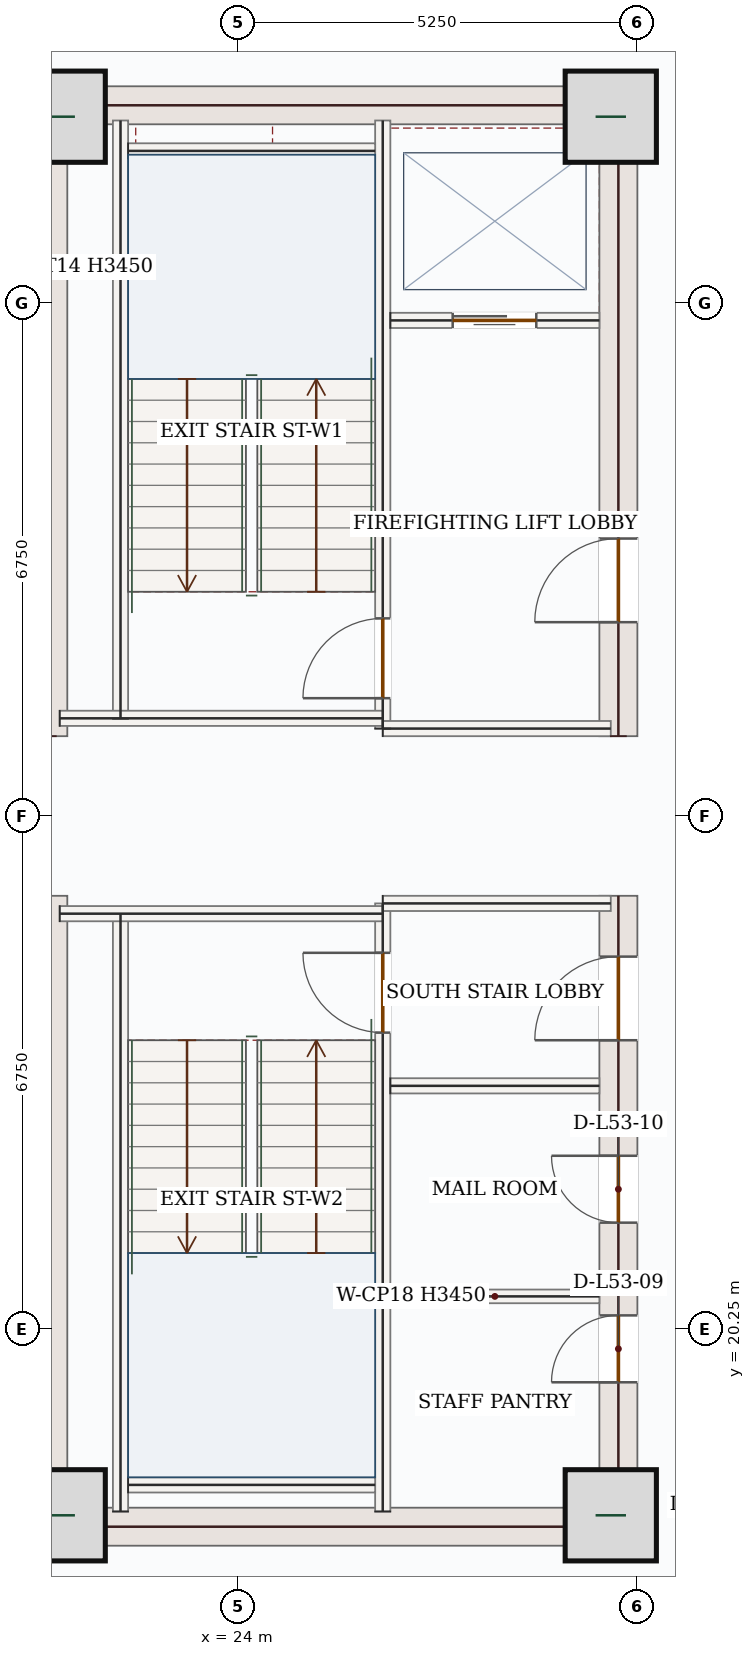
"""IFC4 building model, lengths in metres.
Left out: names, types, materials, properties, quantities, classifications, styles, units other than length and angle.
Written with IfcOpenShell. Run it as: python <this file> out.ifc"""

import sys

from ifc_helpers import new_model, si_unit, direction, frame, frame_2d, origin, origin_2d, place, context, subcontext, project, spatial, rectangle, extrude, source, transform, mapped, element, fill, save


model = new_model("IFC4")
c1 = context("Model", 3, precision=1e-05, world=origin(), true_north=direction((0.0, 1.0)))
c2 = subcontext(c1, "Body", "Model", "MODEL_VIEW")
j1 = project(units=[si_unit("LENGTHUNIT", "METRE"), si_unit("PLANEANGLEUNIT", "RADIAN")], contexts=[c1])
p1 = place(None, origin())
s1 = spatial("IfcSite", under=j1, at=p1, CompositionType="ELEMENT")
p2 = place(p1, origin())
s2 = spatial("IfcBuilding", under=s1, at=p2, CompositionType="ELEMENT")
p3 = place(p2, frame((0.0, 0.0, 225.3)))
s3 = spatial("IfcBuildingStorey", under=s2, at=p3, CompositionType="ELEMENT", Elevation=225.3)
m1 = source(origin(), c2, "Body", "SweptSolid", [
    extrude(rectangle(XDim=8.55, YDim=0.5, at=frame_2d((4.275, 0.0))), origin(), (0.0, 0.0, 1.0), 3.45),
])
for number, where, z_axis, x_axis in (
    (1, (21.5, 17.4, 0.0), (0.0, 0.0, 1.0), (0.0, 1.0, 0.0)),
    (2, (21.5, 28.05, 0.0), (0.0, 0.0, 1.0), (0.0, 1.0, 0.0)),
):
    element("IfcWall", number, at=place(p3, frame(where, z_axis=z_axis, x_axis=x_axis)), inside=s3, PredefinedType="SHEAR", context=c2, shape_type="MappedRepresentation", body=[
        mapped(m1, transform((0.0, 0.0, 0.0), x_axis=(1.0, 0.0, 0.0), y_axis=(0.0, 1.0, 0.0), z_axis=(0.0, 0.0, 1.0), scale=1.0)),
    ])
p4 = place(p3, frame((29.0, 17.4, 0.0), z_axis=(0.0, 0.0, 1.0), x_axis=(0.0, 1.0, 0.0)))
e3 = element("IfcWall", 3, at=p4, inside=s3, PredefinedType="SHEAR", context=c2, shape_type="SweptSolid", body=[
    extrude(rectangle(XDim=8.55, YDim=0.5, at=frame_2d((4.275, 0.0))), origin(), (0.0, 0.0, 1.0), 3.45),
])
p5 = place(p4, frame((6.65, 0.0, 0.0)))
e4 = element("IfcOpeningElement", 4, at=p5, cuts=e3, PredefinedType="OPENING", context=c2, shape_type="SweptSolid", body=[
    extrude(rectangle(XDim=1.1, YDim=2.2, at=frame_2d((0.55, 1.1))), frame((0.0, 0.26, 0.0), z_axis=(0.0, -1.0, 0.0), x_axis=(1.0, 0.0, 0.0)), (0.0, 0.0, 1.0), 0.52),
])
p6 = place(p4, frame((2.15, 0.0, 0.0)))
e5 = element("IfcOpeningElement", 5, at=p6, cuts=e3, PredefinedType="OPENING", context=c2, shape_type="SweptSolid", body=[
    extrude(rectangle(XDim=0.88, YDim=2.1, at=frame_2d((0.44, 1.05))), frame((0.0, 0.26, 0.0), z_axis=(0.0, -1.0, 0.0), x_axis=(1.0, 0.0, 0.0)), (0.0, 0.0, 1.0), 0.52),
])
p7 = place(p4, frame((4.25, 0.0, 0.0)))
e6 = element("IfcOpeningElement", 6, at=p7, cuts=e3, PredefinedType="OPENING", context=c2, shape_type="SweptSolid", body=[
    extrude(rectangle(XDim=0.88, YDim=2.1, at=frame_2d((0.44, 1.05))), frame((0.0, 0.26, 0.0), z_axis=(0.0, -1.0, 0.0), x_axis=(1.0, 0.0, 0.0)), (0.0, 0.0, 1.0), 0.52),
])
p8 = place(p3, frame((29.0, 28.05, 0.0), z_axis=(0.0, 0.0, 1.0), x_axis=(0.0, 1.0, 0.0)))
e7 = element("IfcWall", 7, at=p8, inside=s3, PredefinedType="SHEAR", context=c2, shape_type="SweptSolid", body=[
    extrude(rectangle(XDim=8.55, YDim=0.5, at=frame_2d((4.275, 0.0))), origin(), (0.0, 0.0, 1.0), 3.45),
])
p9 = place(p8, frame((1.5, 0.0, 0.0)))
e8 = element("IfcOpeningElement", 8, at=p9, cuts=e7, PredefinedType="OPENING", context=c2, shape_type="SweptSolid", body=[
    extrude(rectangle(XDim=1.1, YDim=2.2, at=frame_2d((0.55, 1.1))), frame((0.0, 0.26, 0.0), z_axis=(0.0, -1.0, 0.0), x_axis=(1.0, 0.0, 0.0)), (0.0, 0.0, 1.0), 0.52),
])
m2 = source(origin(), c2, "Body", "SweptSolid", [
    extrude(rectangle(XDim=7.0, YDim=0.5, at=frame_2d((3.5, 0.0))), origin(), (0.0, 0.0, 1.0), 3.45),
])
for number, where, z_axis, x_axis in (
    (9, (21.75, 17.65, 0.0), (0.0, 0.0, 1.0), (1.0, 0.0, 0.0)),
    (10, (21.75, 36.35, 0.0), (0.0, 0.0, 1.0), (1.0, 0.0, 0.0)),
):
    element("IfcWall", number, at=place(p3, frame(where, z_axis=z_axis, x_axis=x_axis)), inside=s3, PredefinedType="SHEAR", context=c2, shape_type="MappedRepresentation", body=[
        mapped(m2, transform((0.0, 0.0, 0.0), x_axis=(1.0, 0.0, 0.0), y_axis=(0.0, 1.0, 0.0), z_axis=(0.0, 0.0, 1.0), scale=1.0)),
    ])
m3 = source(origin(), c2, "Body", "SweptSolid", [
    extrude(rectangle(XDim=1.2, YDim=1.2, at=origin_2d()), origin(), (0.0, 0.0, 1.0), 3.9),
])
for number, where, z_axis, x_axis in (
    (11, (21.65, 17.8, 0.0), (0.0, 0.0, 1.0), (1.0, 0.0, 0.0)),
    (12, (28.9, 17.8, 0.0), (0.0, 0.0, 1.0), (1.0, 0.0, 0.0)),
    (13, (21.65, 36.2, 0.0), (0.0, 0.0, 1.0), (1.0, 0.0, 0.0)),
    (14, (28.9, 36.2, 0.0), (0.0, 0.0, 1.0), (1.0, 0.0, 0.0)),
):
    element("IfcColumn", number, at=place(p3, frame(where, z_axis=z_axis, x_axis=x_axis)), inside=s3, PredefinedType="COLUMN", context=c2, shape_type="MappedRepresentation", body=[
        mapped(m3, transform((0.0, 0.0, 0.0), x_axis=(1.0, 0.0, 0.0), y_axis=(0.0, 1.0, 0.0), z_axis=(0.0, 0.0, 1.0), scale=1.0)),
    ])
m4 = source(origin(), c2, "Body", "SweptSolid", [
    extrude(rectangle(XDim=5.258, YDim=0.28, at=frame_2d((2.629, 0.0))), origin(), (0.0, 0.0, 1.0), 3.45),
])
p10 = place(p3, frame((18.94, 35.542, 0.0), z_axis=(0.0, 0.0, 1.0), x_axis=(0.707106781187, 0.707106781187, 0.0)))
e15 = element("IfcWall", 15, at=p10, inside=s3, PredefinedType="SOLIDWALL", context=c2, shape_type="MappedRepresentation", body=[
    mapped(m4, transform((0.0, 0.0, 0.0), x_axis=(1.0, 0.0, 0.0), y_axis=(0.0, 1.0, 0.0), z_axis=(0.0, 0.0, 1.0), scale=1.0)),
])
m5 = source(origin(), c2, "Body", "SweptSolid", [
    extrude(rectangle(XDim=7.87, YDim=0.2, at=frame_2d((3.935, 0.0))), origin(), (0.0, 0.0, 1.0), 3.45),
])
for number, where, z_axis, x_axis in (
    (16, (22.45, 17.85, 0.0), (0.0, 0.0, 1.0), (0.0, 1.0, 0.0)),
    (17, (22.45, 28.28, 0.0), (0.0, 0.0, 1.0), (0.0, 1.0, 0.0)),
):
    element("IfcWall", number, at=place(p3, frame(where, z_axis=z_axis, x_axis=x_axis)), inside=s3, PredefinedType="SOLIDWALL", context=c2, shape_type="MappedRepresentation", body=[
        mapped(m5, transform((0.0, 0.0, 0.0), x_axis=(1.0, 0.0, 0.0), y_axis=(0.0, 1.0, 0.0), z_axis=(0.0, 0.0, 1.0), scale=1.0)),
    ])
p11 = place(p3, frame((25.9, 17.85, 0.0), z_axis=(0.0, 0.0, 1.0), x_axis=(0.0, 1.0, 0.0)))
e18 = element("IfcWall", 18, at=p11, inside=s3, PredefinedType="SOLIDWALL", context=c2, shape_type="SweptSolid", body=[
    extrude(rectangle(XDim=8.0, YDim=0.2, at=frame_2d((4.0, 0.0))), origin(), (0.0, 0.0, 1.0), 3.45),
])
p12 = place(p11, frame((6.3, 0.0, 0.0)))
e19 = element("IfcOpeningElement", 19, at=p12, cuts=e18, PredefinedType="OPENING", context=c2, shape_type="SweptSolid", body=[
    extrude(rectangle(XDim=1.05, YDim=2.15, at=frame_2d((0.525, 1.075))), frame((0.0, 0.11, 0.0), z_axis=(0.0, -1.0, 0.0), x_axis=(1.0, 0.0, 0.0)), (0.0, 0.0, 1.0), 0.22),
])
p13 = place(p3, frame((25.9, 28.15, 0.0), z_axis=(0.0, 0.0, 1.0), x_axis=(0.0, 1.0, 0.0)))
e20 = element("IfcWall", 20, at=p13, inside=s3, PredefinedType="SOLIDWALL", context=c2, shape_type="SweptSolid", body=[
    extrude(rectangle(XDim=8.0, YDim=0.2, at=frame_2d((4.0, 0.0))), origin(), (0.0, 0.0, 1.0), 3.45),
])
p14 = place(p13, frame((0.4, 0.0, 0.0)))
e21 = element("IfcOpeningElement", 21, at=p14, cuts=e20, PredefinedType="OPENING", context=c2, shape_type="SweptSolid", body=[
    extrude(rectangle(XDim=1.05, YDim=2.15, at=frame_2d((0.525, 1.075))), frame((0.0, 0.11, 0.0), z_axis=(0.0, -1.0, 0.0), x_axis=(1.0, 0.0, 0.0)), (0.0, 0.0, 1.0), 0.22),
])
m6 = source(origin(), c2, "Body", "SweptSolid", [
    extrude(rectangle(XDim=4.25, YDim=0.2, at=frame_2d((2.125, 0.0))), origin(), (0.0, 0.0, 1.0), 3.45),
])
p15 = place(p3, frame((21.65, 25.715, 0.0), z_axis=(0.0, 0.0, 1.0), x_axis=(1.0, 0.0, 0.0)))
e22 = element("IfcWall", 22, at=p15, inside=s3, PredefinedType="SOLIDWALL", context=c2, shape_type="MappedRepresentation", body=[
    mapped(m6, transform((0.0, 0.0, 0.0), x_axis=(1.0, 0.0, 0.0), y_axis=(0.0, 1.0, 0.0), z_axis=(0.0, 0.0, 1.0), scale=1.0)),
])
m7 = source(origin(), c2, "Body", "SweptSolid", [
    extrude(rectangle(XDim=3.0, YDim=0.2, at=frame_2d((1.5, 0.0))), origin(), (0.0, 0.0, 1.0), 3.45),
])
p16 = place(p3, frame((25.9, 25.85, 0.0), z_axis=(0.0, 0.0, 1.0), x_axis=(1.0, 0.0, 0.0)))
e23 = element("IfcWall", 23, at=p16, inside=s3, PredefinedType="SOLIDWALL", context=c2, shape_type="MappedRepresentation", body=[
    mapped(m7, transform((0.0, 0.0, 0.0), x_axis=(1.0, 0.0, 0.0), y_axis=(0.0, 1.0, 0.0), z_axis=(0.0, 0.0, 1.0), scale=1.0)),
])
p17 = place(p3, frame((21.65, 28.285, 0.0), z_axis=(0.0, 0.0, 1.0), x_axis=(1.0, 0.0, 0.0)))
e24 = element("IfcWall", 24, at=p17, inside=s3, PredefinedType="SOLIDWALL", context=c2, shape_type="MappedRepresentation", body=[
    mapped(m6, transform((0.0, 0.0, 0.0), x_axis=(1.0, 0.0, 0.0), y_axis=(0.0, 1.0, 0.0), z_axis=(0.0, 0.0, 1.0), scale=1.0)),
])
p18 = place(p3, frame((25.9, 28.15, 0.0), z_axis=(0.0, 0.0, 1.0), x_axis=(1.0, 0.0, 0.0)))
e25 = element("IfcWall", 25, at=p18, inside=s3, PredefinedType="SOLIDWALL", context=c2, shape_type="MappedRepresentation", body=[
    mapped(m7, transform((0.0, 0.0, 0.0), x_axis=(1.0, 0.0, 0.0), y_axis=(0.0, 1.0, 0.0), z_axis=(0.0, 0.0, 1.0), scale=1.0)),
])
m8 = source(origin(), c2, "Body", "SweptSolid", [
    extrude(rectangle(XDim=3.25, YDim=0.2, at=frame_2d((1.625, 0.0))), origin(), (0.0, 0.0, 1.0), 3.45),
])
for number, where, z_axis, x_axis in (
    (26, (22.55, 35.75, 0.0), (0.0, 0.0, 1.0), (1.0, 0.0, 0.0)),
    (27, (22.55, 18.2, 0.0), (0.0, 0.0, 1.0), (1.0, 0.0, 0.0)),
):
    element("IfcWall", number, at=place(p3, frame(where, z_axis=z_axis, x_axis=x_axis)), inside=s3, PredefinedType="SOLIDWALL", context=c2, shape_type="MappedRepresentation", body=[
        mapped(m8, transform((0.0, 0.0, 0.0), x_axis=(1.0, 0.0, 0.0), y_axis=(0.0, 1.0, 0.0), z_axis=(0.0, 0.0, 1.0), scale=1.0)),
    ])
p19 = place(p3, frame((26.0, 33.52, 0.0), z_axis=(0.0, 0.0, 1.0), x_axis=(1.0, 0.0, 0.0)))
e28 = element("IfcWall", 28, at=p19, inside=s3, PredefinedType="SOLIDWALL", context=c2, shape_type="SweptSolid", body=[
    extrude(rectangle(XDim=2.75, YDim=0.2, at=frame_2d((1.375, 0.0))), origin(), (0.0, 0.0, 1.0), 3.45),
])
p20 = place(p19, frame((0.82, 0.0, 0.0)))
e29 = element("IfcOpeningElement", 29, at=p20, cuts=e28, PredefinedType="OPENING", context=c2, shape_type="SweptSolid", body=[
    extrude(rectangle(XDim=1.1, YDim=2.15, at=frame_2d((0.55, 1.075))), frame((0.0, 0.11, 0.0), z_axis=(0.0, -1.0, 0.0), x_axis=(1.0, 0.0, 0.0)), (0.0, 0.0, 1.0), 0.22),
])
m9 = source(origin(), c2, "Body", "SweptSolid", [
    extrude(rectangle(XDim=2.75, YDim=0.2, at=frame_2d((1.375, 0.0))), origin(), (0.0, 0.0, 1.0), 3.45),
])
p21 = place(p3, frame((26.0, 23.45, 0.0), z_axis=(0.0, 0.0, 1.0), x_axis=(1.0, 0.0, 0.0)))
e30 = element("IfcWall", 30, at=p21, inside=s3, PredefinedType="SOLIDWALL", context=c2, shape_type="MappedRepresentation", body=[
    mapped(m9, transform((0.0, 0.0, 0.0), x_axis=(1.0, 0.0, 0.0), y_axis=(0.0, 1.0, 0.0), z_axis=(0.0, 0.0, 1.0), scale=1.0)),
])
m10 = source(origin(), c2, "Body", "SweptSolid", [
    extrude(rectangle(XDim=2.75, YDim=0.18, at=frame_2d((1.375, 0.0))), origin(), (0.0, 0.0, 1.0), 3.45),
])
p22 = place(p3, frame((26.0, 20.68, 0.0), z_axis=(0.0, 0.0, 1.0), x_axis=(1.0, 0.0, 0.0)))
e31 = element("IfcWall", 31, at=p22, inside=s3, PredefinedType="PARTITIONING", context=c2, shape_type="MappedRepresentation", body=[
    mapped(m10, transform((0.0, 0.0, 0.0), x_axis=(1.0, 0.0, 0.0), y_axis=(0.0, 1.0, 0.0), z_axis=(0.0, 0.0, 1.0), scale=1.0)),
])
m11 = source(origin(), c2, "Body", "SweptSolid", [
    extrude(rectangle(XDim=1.05, YDim=2.15, at=frame_2d((0.525, 1.075))), frame((0.0, 0.025, 0.0), z_axis=(0.0, -1.0, 0.0), x_axis=(1.0, 0.0, 0.0)), (0.0, 0.0, 1.0), 0.05),
])
p23 = place(p14, origin())
e32 = element("IfcDoor", 32, at=p23, inside=s3, OperationType="SINGLE_SWING_LEFT", PredefinedType="DOOR", context=c2, shape_type="MappedRepresentation", body=[
    mapped(m11, transform((0.0, 0.0, 0.0), x_axis=(1.0, 0.0, 0.0), y_axis=(0.0, 1.0, 0.0), z_axis=(0.0, 0.0, 1.0), scale=1.0)),
])
fill(e21, e32)
p24 = place(p12, origin())
e33 = element("IfcDoor", 33, at=p24, inside=s3, OperationType="SINGLE_SWING_RIGHT", PredefinedType="DOOR", context=c2, shape_type="MappedRepresentation", body=[
    mapped(m11, transform((0.0, 0.0, 0.0), x_axis=(1.0, 0.0, 0.0), y_axis=(0.0, 1.0, 0.0), z_axis=(0.0, 0.0, 1.0), scale=1.0)),
])
fill(e19, e33)
m12 = source(origin(), c2, "Body", "SweptSolid", [
    extrude(rectangle(XDim=1.1, YDim=2.15, at=frame_2d((0.55, 1.075))), frame((0.0, 0.025, 0.0), z_axis=(0.0, -1.0, 0.0), x_axis=(1.0, 0.0, 0.0)), (0.0, 0.0, 1.0), 0.05),
])
p25 = place(p20, origin())
e34 = element("IfcDoor", 34, at=p25, inside=s3, OperationType="DOUBLE_DOOR_SLIDING", PredefinedType="DOOR", context=c2, shape_type="MappedRepresentation", body=[
    mapped(m12, transform((0.0, 0.0, 0.0), x_axis=(1.0, 0.0, 0.0), y_axis=(0.0, 1.0, 0.0), z_axis=(0.0, 0.0, 1.0), scale=1.0)),
])
fill(e29, e34)
m13 = source(origin(), c2, "Body", "SweptSolid", [
    extrude(rectangle(XDim=1.1, YDim=2.2, at=frame_2d((0.55, 1.1))), frame((0.0, 0.025, 0.0), z_axis=(0.0, -1.0, 0.0), x_axis=(1.0, 0.0, 0.0)), (0.0, 0.0, 1.0), 0.05),
])
p26 = place(p9, origin())
e35 = element("IfcDoor", 35, at=p26, inside=s3, OperationType="SINGLE_SWING_LEFT", PredefinedType="DOOR", context=c2, shape_type="MappedRepresentation", body=[
    mapped(m13, transform((0.0, 0.0, 0.0), x_axis=(1.0, 0.0, 0.0), y_axis=(0.0, 1.0, 0.0), z_axis=(0.0, 0.0, 1.0), scale=1.0)),
])
fill(e8, e35)
p27 = place(p5, origin())
e36 = element("IfcDoor", 36, at=p27, inside=s3, OperationType="SINGLE_SWING_LEFT", PredefinedType="DOOR", context=c2, shape_type="MappedRepresentation", body=[
    mapped(m13, transform((0.0, 0.0, 0.0), x_axis=(1.0, 0.0, 0.0), y_axis=(0.0, 1.0, 0.0), z_axis=(0.0, 0.0, 1.0), scale=1.0)),
])
fill(e4, e36)
m14 = source(origin(), c2, "Body", "SweptSolid", [
    extrude(rectangle(XDim=0.88, YDim=2.1, at=frame_2d((0.44, 1.05))), frame((0.0, 0.025, 0.0), z_axis=(0.0, -1.0, 0.0), x_axis=(1.0, 0.0, 0.0)), (0.0, 0.0, 1.0), 0.05),
])
p28 = place(p6, origin())
e37 = element("IfcDoor", 37, at=p28, inside=s3, OperationType="SINGLE_SWING_LEFT", PredefinedType="DOOR", context=c2, shape_type="MappedRepresentation", body=[
    mapped(m14, transform((0.0, 0.0, 0.0), x_axis=(1.0, 0.0, 0.0), y_axis=(0.0, 1.0, 0.0), z_axis=(0.0, 0.0, 1.0), scale=1.0)),
])
fill(e5, e37)
p29 = place(p7, origin())
e38 = element("IfcDoor", 38, at=p29, inside=s3, OperationType="SINGLE_SWING_RIGHT", PredefinedType="DOOR", context=c2, shape_type="MappedRepresentation", body=[
    mapped(m14, transform((0.0, 0.0, 0.0), x_axis=(1.0, 0.0, 0.0), y_axis=(0.0, 1.0, 0.0), z_axis=(0.0, 0.0, 1.0), scale=1.0)),
])
fill(e6, e38)
save(model, sys.argv[1])
